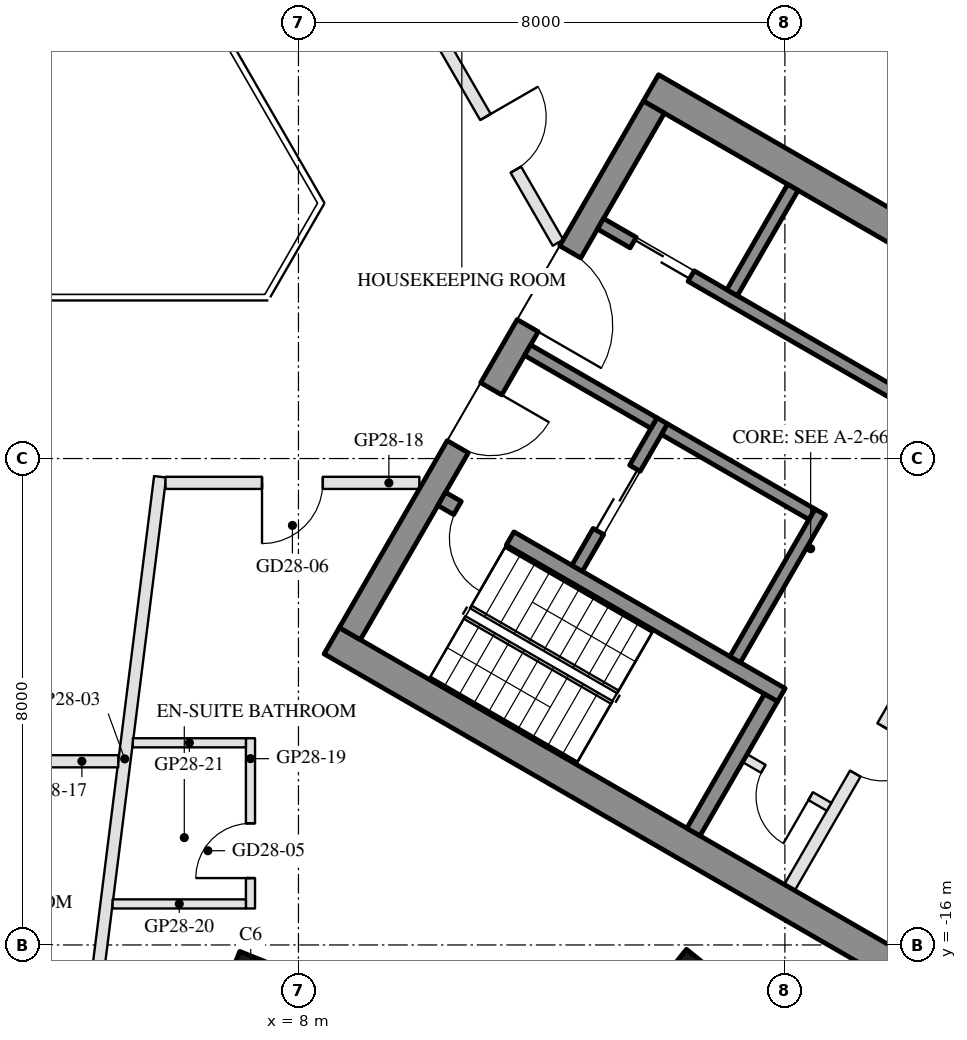
"""IFC4 building model, lengths in metres.
Left out: names, types, materials, properties, quantities, classifications, styles, units other than length and angle.
Written with IfcOpenShell. Run it as: python <this file> out.ifc"""

import sys

from ifc_helpers import new_model, si_unit, direction, frame, frame_2d, origin, origin_2d, place, context, subcontext, project, spatial, rectangle, hollow_rectangle, extrude, boolean, halfspace, element, fill, save


model = new_model("IFC4")
c1 = context("Model", 3, precision=1e-05, world=origin(), true_north=direction((0.0, 1.0)))
c2 = subcontext(c1, "Body", "Model", "MODEL_VIEW")
j1 = project(units=[si_unit("LENGTHUNIT", "METRE"), si_unit("PLANEANGLEUNIT", "RADIAN")], contexts=[c1])
p1 = place(None, origin())
s1 = spatial("IfcSite", under=j1, at=p1, CompositionType="ELEMENT")
p2 = place(p1, origin())
s2 = spatial("IfcBuilding", under=s1, at=p2, CompositionType="ELEMENT")
p3 = place(p2, frame((0.0, 0.0, 287.4)))
s3 = spatial("IfcBuildingStorey", under=s2, at=p3, CompositionType="ELEMENT", Elevation=287.4)
p4 = place(p3, frame((7.215, -16.529, 0.0), z_axis=(-0.060866554019, 0.151222465225, 0.986624056373), x_axis=(0.998135530126, 0.004712991743, 0.06085434421)))
e1 = element("IfcColumn", 1, at=p4, inside=s3, PredefinedType="COLUMN", context=c2, shape_type="SweptSolid", body=[
    boolean("DIFFERENCE", boolean("DIFFERENCE", extrude(hollow_rectangle(XDim=0.65, YDim=0.65, WallThickness=0.03, at=origin_2d()), origin(), (0.0, 0.0, 1.0), 3.75), halfspace(frame((0.0, 0.0, 0.04), z_axis=(0.0, 0.0, 1.0), x_axis=(1.0, 0.0, 0.0)), True)), halfspace(frame((0.0, 0.0, 3.711), z_axis=(0.0, 0.0, 1.0), x_axis=(1.0, 0.0, 0.0)), False)),
])
p5 = place(p3, frame((14.431, -16.529, 0.0), z_axis=(-0.121062211455, 0.150389046636, 0.981186565139), x_axis=(0.992602517882, 0.00920416117, 0.121060005413)))
e2 = element("IfcColumn", 2, at=p5, inside=s3, PredefinedType="COLUMN", context=c2, shape_type="SweptSolid", body=[
    boolean("DIFFERENCE", boolean("DIFFERENCE", extrude(hollow_rectangle(XDim=0.65, YDim=0.65, WallThickness=0.03, at=origin_2d()), origin(), (0.0, 0.0, 1.0), 3.771), halfspace(frame((0.0, 0.0, 0.047), z_axis=(0.0, 0.0, 1.0), x_axis=(1.0, 0.0, 0.0)), True)), halfspace(frame((0.0, 0.0, 3.724), z_axis=(0.0, 0.0, 1.0), x_axis=(1.0, 0.0, 0.0)), False)),
])
for number, where, z_axis, x_axis in (
    (3, (8.547, -10.997, 0.0), (0.0, 0.0, 1.0), (0.866, -0.5, 0.0)),
    (4, (13.797, -1.903, 0.0), (0.0, 0.0, 1.0), (0.866, -0.5, 0.0)),
):
    element("IfcWall", number, at=place(p3, frame(where, z_axis=z_axis, x_axis=x_axis)), inside=s3, PredefinedType="SHEAR", context=c2, shape_type="SweptSolid", body=[
        extrude(rectangle(XDim=12.129, YDim=0.5, at=frame_2d((6.064, 0.0))), origin(), (0.0, 0.0, 1.0), 3.5),
    ])
p6 = place(p3, frame((8.845, -10.88, 0.0), z_axis=(0.0, 0.0, 1.0), x_axis=(0.500004234368, 0.866022959057, 0.0)))
e5 = element("IfcWall", 5, at=p6, inside=s3, PredefinedType="SHEAR", context=c2, shape_type="SweptSolid", body=[
    extrude(rectangle(XDim=10.0, YDim=0.4, at=frame_2d((5.0, 0.0))), origin(), (0.0, 0.0, 1.0), 3.5),
])
p7 = place(p6, frame((3.55, 0.0, 0.0)))
e6 = element("IfcOpeningElement", 6, at=p7, cuts=e5, PredefinedType="OPENING", context=c2, shape_type="SweptSolid", body=[
    extrude(rectangle(XDim=1.1, YDim=2.1, at=frame_2d((0.55, 1.05))), frame((0.0, 0.21, 0.0), z_axis=(0.0, -1.0, 0.0), x_axis=(1.0, 0.0, 0.0)), (0.0, 0.0, 1.0), 0.42),
])
p8 = place(p6, frame((5.85, 0.0, 0.0)))
e7 = element("IfcOpeningElement", 7, at=p8, cuts=e5, PredefinedType="OPENING", context=c2, shape_type="SweptSolid", body=[
    extrude(rectangle(XDim=1.4, YDim=2.1, at=frame_2d((0.7, 1.05))), frame((0.0, 0.21, 0.0), z_axis=(0.0, -1.0, 0.0), x_axis=(1.0, 0.0, 0.0)), (0.0, 0.0, 1.0), 0.42),
])
p9 = place(p3, frame((10.356, -8.664, 0.0), z_axis=(0.0, 0.0, 1.0), x_axis=(0.866028629588, -0.499994412703, 0.0)))
e8 = element("IfcWall", 8, at=p9, inside=s3, PredefinedType="SHEAR", context=c2, shape_type="SweptSolid", body=[
    extrude(rectangle(XDim=6.45, YDim=0.25, at=frame_2d((3.225, 0.0))), origin(), (0.0, 0.0, 1.0), 3.5),
])
p10 = place(p9, frame((0.3, 0.0, 0.0)))
e9 = element("IfcOpeningElement", 9, at=p10, cuts=e8, PredefinedType="OPENING", context=c2, shape_type="SweptSolid", body=[
    extrude(rectangle(XDim=1.0, YDim=2.1, at=frame_2d((0.5, 1.05))), frame((0.0, 0.135, 0.0), z_axis=(0.0, -1.0, 0.0), x_axis=(1.0, 0.0, 0.0)), (0.0, 0.0, 1.0), 0.27),
])
p11 = place(p3, frame((14.496, -14.143, 0.0), z_axis=(0.0, 0.0, 1.0), x_axis=(0.500062241894, 0.865989465428, 0.0)))
e10 = element("IfcWall", 10, at=p11, inside=s3, PredefinedType="SHEAR", context=c2, shape_type="SweptSolid", body=[
    extrude(rectangle(XDim=2.55, YDim=0.25, at=frame_2d((1.275, 0.0))), origin(), (0.0, 0.0, 1.0), 3.5),
])
p12 = place(p3, frame((15.181, -11.305, 0.0), z_axis=(0.0, 0.0, 1.0), x_axis=(0.49994636267, 0.866056369097, 0.0)))
e11 = element("IfcWall", 11, at=p12, inside=s3, PredefinedType="SHEAR", context=c2, shape_type="SweptSolid", body=[
    extrude(rectangle(XDim=2.8, YDim=0.2, at=frame_2d((1.4, 0.0))), origin(), (0.0, 0.0, 1.0), 3.5),
])
p13 = place(p3, frame((12.583, -9.805, 0.0), z_axis=(0.0, 0.0, 1.0), x_axis=(0.49994636267, 0.866056369097, 0.0)))
e12 = element("IfcWall", 12, at=p13, inside=s3, PredefinedType="SHEAR", context=c2, shape_type="SweptSolid", body=[
    extrude(rectangle(XDim=2.8, YDim=0.2, at=frame_2d((1.4, 0.0))), origin(), (0.0, 0.0, 1.0), 3.5),
])
p14 = place(p13, frame((0.7, 0.0, 0.0)))
e13 = element("IfcOpeningElement", 13, at=p14, cuts=e12, PredefinedType="OPENING", context=c2, shape_type="SweptSolid", body=[
    extrude(rectangle(XDim=1.2, YDim=2.1, at=frame_2d((0.6, 1.05))), frame((0.0, 0.11, 0.0), z_axis=(0.0, -1.0, 0.0), x_axis=(1.0, 0.0, 0.0)), (0.0, 0.0, 1.0), 0.22),
])
p15 = place(p3, frame((11.768, -6.217, 0.0), z_axis=(0.0, 0.0, 1.0), x_axis=(0.866050077142, -0.499957262057, 0.0)))
e14 = element("IfcWall", 14, at=p15, inside=s3, PredefinedType="SHEAR", context=c2, shape_type="SweptSolid", body=[
    extrude(rectangle(XDim=2.4, YDim=0.2, at=frame_2d((1.2, 0.0))), origin(), (0.0, 0.0, 1.0), 3.5),
])
p16 = place(p3, frame((14.02, -7.517, 0.0), z_axis=(0.0, 0.0, 1.0), x_axis=(0.866034573852, -0.49998411664, 0.0)))
e15 = element("IfcWall", 15, at=p16, inside=s3, PredefinedType="SHEAR", context=c2, shape_type="SweptSolid", body=[
    extrude(rectangle(XDim=2.8, YDim=0.2, at=frame_2d((1.4, 0.0))), origin(), (0.0, 0.0, 1.0), 3.5),
])
p17 = place(p3, frame((12.968, -4.138, 0.0), z_axis=(0.0, 0.0, 1.0), x_axis=(0.866028328073, -0.49999493495, 0.0)))
e16 = element("IfcWall", 16, at=p17, inside=s3, PredefinedType="SHEAR", context=c2, shape_type="SweptSolid", body=[
    extrude(rectangle(XDim=10.16, YDim=0.2, at=frame_2d((5.08, 0.0))), origin(), (0.0, 0.0, 1.0), 3.5),
])
p18 = place(p17, frame((0.62, 0.0, 0.0)))
e17 = element("IfcOpeningElement", 17, at=p18, cuts=e16, PredefinedType="OPENING", context=c2, shape_type="SweptSolid", body=[
    extrude(rectangle(XDim=1.1, YDim=2.1, at=frame_2d((0.55, 1.05))), frame((0.0, 0.11, 0.0), z_axis=(0.0, -1.0, 0.0), x_axis=(1.0, 0.0, 0.0)), (0.0, 0.0, 1.0), 0.22),
])
p19 = place(p17, frame((5.8, 0.0, 0.0)))
e18 = element("IfcOpeningElement", 18, at=p19, cuts=e16, PredefinedType="OPENING", context=c2, shape_type="SweptSolid", body=[
    extrude(rectangle(XDim=0.9, YDim=2.1, at=frame_2d((0.45, 1.05))), frame((0.0, 0.11, 0.0), z_axis=(0.0, -1.0, 0.0), x_axis=(1.0, 0.0, 0.0)), (0.0, 0.0, 1.0), 0.22),
])
p20 = place(p3, frame((15.131, -5.272, 0.0), z_axis=(0.0, 0.0, 1.0), x_axis=(0.499972520799, 0.866041268327, 0.0)))
e19 = element("IfcWall", 19, at=p20, inside=s3, PredefinedType="SHEAR", context=c2, shape_type="SweptSolid", body=[
    extrude(rectangle(XDim=2.0, YDim=0.2, at=frame_2d((1.0, 0.0))), origin(), (0.0, 0.0, 1.0), 3.5),
])
p21 = place(p3, frame((16.076, -15.055, 0.0), z_axis=(0.0, 0.0, 1.0), x_axis=(0.499995103361, 0.866028230842, 0.0)))
e20 = element("IfcWall", 20, at=p21, inside=s3, PredefinedType="PARTITIONING", context=c2, shape_type="SweptSolid", body=[
    extrude(rectangle(XDim=5.4, YDim=0.2, at=frame_2d((2.7, 0.0))), origin(), (0.0, 0.0, 1.0), 3.5),
])
p22 = place(p21, frame((2.163, 0.0, 0.0)))
e21 = element("IfcOpeningElement", 21, at=p22, cuts=e20, PredefinedType="OPENING", context=c2, shape_type="SweptSolid", body=[
    extrude(rectangle(XDim=0.9, YDim=2.1, at=frame_2d((0.45, 1.05))), frame((0.0, 0.11, 0.0), z_axis=(0.0, -1.0, 0.0), x_axis=(1.0, 0.0, 0.0)), (0.0, 0.0, 1.0), 0.22),
])
p23 = place(p21, frame((4.038, 0.0, 0.0)))
e22 = element("IfcOpeningElement", 22, at=p23, cuts=e20, PredefinedType="OPENING", context=c2, shape_type="SweptSolid", body=[
    extrude(rectangle(XDim=0.9, YDim=2.1, at=frame_2d((0.45, 1.05))), frame((0.0, 0.11, 0.0), z_axis=(0.0, -1.0, 0.0), x_axis=(1.0, 0.0, 0.0)), (0.0, 0.0, 1.0), 0.22),
])
p24 = place(p3, frame((15.342, -12.928, 0.0), z_axis=(0.0, 0.0, 1.0), x_axis=(0.865989903783, -0.500061482766, 0.0)))
e23 = element("IfcWall", 23, at=p24, inside=s3, PredefinedType="PARTITIONING", context=c2, shape_type="SweptSolid", body=[
    extrude(rectangle(XDim=1.6, YDim=0.15, at=frame_2d((0.8, 0.0))), origin(), (0.0, 0.0, 1.0), 3.5),
])
p25 = place(p24, frame((0.35, 0.0, 0.0)))
e24 = element("IfcOpeningElement", 24, at=p25, cuts=e23, PredefinedType="OPENING", context=c2, shape_type="SweptSolid", body=[
    extrude(rectangle(XDim=0.9, YDim=2.1, at=frame_2d((0.45, 1.05))), frame((0.0, 0.085, 0.0), z_axis=(0.0, -1.0, 0.0), x_axis=(1.0, 0.0, 0.0)), (0.0, 0.0, 1.0), 0.17),
])
p26 = place(p3, frame((4.56, -17.579, 0.0), z_axis=(0.0, 0.0, 1.0), x_axis=(0.124584174438, 0.992209042228, 0.0)))
e25 = element("IfcWall", 25, at=p26, inside=s3, PredefinedType="PARTITIONING", context=c2, shape_type="SweptSolid", body=[
    extrude(rectangle(XDim=9.351, YDim=0.2, at=frame_2d((4.676, 0.0))), origin(), (0.0, 0.0, 1.0), 3.1),
])
p27 = place(p3, frame((5.037, -12.979, 0.0), z_axis=(0.0, 0.0, 1.0), x_axis=(-1.0, 0.0, 0.0)))
e26 = element("IfcWall", 26, at=p27, inside=s3, PredefinedType="PARTITIONING", context=c2, shape_type="SweptSolid", body=[
    extrude(rectangle(XDim=4.988, YDim=0.2, at=frame_2d((2.494, 0.0))), origin(), (0.0, 0.0, 1.0), 3.05),
])
p28 = place(p27, frame((1.994, 0.0, 0.0)))
e27 = element("IfcOpeningElement", 27, at=p28, cuts=e26, PredefinedType="OPENING", context=c2, shape_type="SweptSolid", body=[
    extrude(rectangle(XDim=1.0, YDim=2.1, at=frame_2d((0.5, 1.05))), frame((0.0, 0.11, 0.0), z_axis=(0.0, -1.0, 0.0), x_axis=(1.0, 0.0, 0.0)), (0.0, 0.0, 1.0), 0.22),
])
p29 = place(p3, frame((9.988, -8.4, 0.0), z_axis=(0.0, 0.0, 1.0), x_axis=(-1.0, 0.0, 0.0)))
e28 = element("IfcWall", 28, at=p29, inside=s3, PredefinedType="PARTITIONING", context=c2, shape_type="SweptSolid", body=[
    extrude(rectangle(XDim=4.175, YDim=0.2, at=frame_2d((2.087, 0.0))), origin(), (0.0, 0.0, 1.0), 3.05),
])
p30 = place(p29, frame((1.587, 0.0, 0.0)))
e29 = element("IfcOpeningElement", 29, at=p30, cuts=e28, PredefinedType="OPENING", context=c2, shape_type="SweptSolid", body=[
    extrude(rectangle(XDim=1.0, YDim=2.1, at=frame_2d((0.5, 1.05))), frame((0.0, 0.11, 0.0), z_axis=(0.0, -1.0, 0.0), x_axis=(1.0, 0.0, 0.0)), (0.0, 0.0, 1.0), 0.22),
])
p31 = place(p3, frame((7.211, -15.4, 0.0), z_axis=(0.0, 0.0, 1.0), x_axis=(0.0, 1.0, 0.0)))
e30 = element("IfcWall", 30, at=p31, inside=s3, PredefinedType="PARTITIONING", context=c2, shape_type="SweptSolid", body=[
    extrude(rectangle(XDim=2.8, YDim=0.15, at=frame_2d((1.4, 0.0))), origin(), (0.0, 0.0, 1.0), 3.55),
])
p32 = place(p31, frame((0.5, 0.0, 0.0)))
e31 = element("IfcOpeningElement", 31, at=p32, cuts=e30, PredefinedType="OPENING", context=c2, shape_type="SweptSolid", body=[
    extrude(rectangle(XDim=0.9, YDim=2.1, at=frame_2d((0.45, 1.05))), frame((0.0, 0.085, 0.0), z_axis=(0.0, -1.0, 0.0), x_axis=(1.0, 0.0, 0.0)), (0.0, 0.0, 1.0), 0.17),
])
p33 = place(p3, frame((4.944, -15.325, 0.0), z_axis=(0.0, 0.0, 1.0), x_axis=(1.0, 0.0, 0.0)))
e32 = element("IfcWall", 32, at=p33, inside=s3, PredefinedType="PARTITIONING", context=c2, shape_type="SweptSolid", body=[
    extrude(rectangle(XDim=2.192, YDim=0.15, at=frame_2d((1.096, 0.0))), origin(), (0.0, 0.0, 1.0), 3.05),
])
p34 = place(p3, frame((5.277, -12.675, 0.0), z_axis=(0.0, 0.0, 1.0), x_axis=(1.0, 0.0, 0.0)))
e33 = element("IfcWall", 33, at=p34, inside=s3, PredefinedType="PARTITIONING", context=c2, shape_type="SweptSolid", body=[
    extrude(rectangle(XDim=1.859, YDim=0.15, at=frame_2d((0.93, 0.0))), origin(), (0.0, 0.0, 1.0), 3.05),
])
p35 = place(p3, frame((10.382, -1.182, 0.0), z_axis=(0.0, 0.0, 1.0), x_axis=(0.50002859319, -0.866008894869, 0.0)))
e34 = element("IfcWall", 34, at=p35, inside=s3, PredefinedType="PARTITIONING", context=c2, shape_type="SweptSolid", body=[
    extrude(rectangle(XDim=3.774, YDim=0.2, at=frame_2d((1.887, 0.0))), origin(), (0.0, 0.0, 1.0), 3.05),
])
p36 = place(p35, frame((1.387, 0.0, 0.0)))
e35 = element("IfcOpeningElement", 35, at=p36, cuts=e34, PredefinedType="OPENING", context=c2, shape_type="SweptSolid", body=[
    extrude(rectangle(XDim=1.0, YDim=2.1, at=frame_2d((0.5, 1.05))), frame((0.0, 0.11, 0.0), z_axis=(0.0, -1.0, 0.0), x_axis=(1.0, 0.0, 0.0)), (0.0, 0.0, 1.0), 0.22),
])
p37 = place(p14, origin())
e36 = element("IfcDoor", 36, at=p37, inside=s3, OperationType="DOUBLE_DOOR_SLIDING", PredefinedType="DOOR", context=c2, shape_type="SweptSolid", body=[
    extrude(rectangle(XDim=1.2, YDim=2.1, at=frame_2d((0.6, 1.05))), frame((0.0, 0.025, 0.0), z_axis=(0.0, -1.0, 0.0), x_axis=(1.0, 0.0, 0.0)), (0.0, 0.0, 1.0), 0.05),
])
fill(e13, e36)
p38 = place(p25, frame((0.9, 0.0, 0.0), z_axis=(0.0, 0.0, 1.0), x_axis=(-1.0, 0.0, 0.0)))
e37 = element("IfcDoor", 37, at=p38, inside=s3, OperationType="SINGLE_SWING_LEFT", PredefinedType="DOOR", context=c2, shape_type="SweptSolid", body=[
    extrude(rectangle(XDim=0.9, YDim=2.1, at=frame_2d((0.45, 1.05))), frame((0.0, 0.025, 0.0), z_axis=(0.0, -1.0, 0.0), x_axis=(1.0, 0.0, 0.0)), (0.0, 0.0, 1.0), 0.05),
])
fill(e24, e37)
p39 = place(p18, origin())
e38 = element("IfcDoor", 38, at=p39, inside=s3, OperationType="DOUBLE_DOOR_SLIDING", PredefinedType="DOOR", context=c2, shape_type="SweptSolid", body=[
    extrude(rectangle(XDim=1.1, YDim=2.1, at=frame_2d((0.55, 1.05))), frame((0.0, 0.025, 0.0), z_axis=(0.0, -1.0, 0.0), x_axis=(1.0, 0.0, 0.0)), (0.0, 0.0, 1.0), 0.05),
])
fill(e17, e38)
p40 = place(p22, frame((0.9, 0.0, 0.0), z_axis=(0.0, 0.0, 1.0), x_axis=(-1.0, 0.0, 0.0)))
e39 = element("IfcDoor", 39, at=p40, inside=s3, OperationType="SINGLE_SWING_LEFT", PredefinedType="DOOR", context=c2, shape_type="SweptSolid", body=[
    extrude(rectangle(XDim=0.9, YDim=2.1, at=frame_2d((0.45, 1.05))), frame((0.0, 0.025, 0.0), z_axis=(0.0, -1.0, 0.0), x_axis=(1.0, 0.0, 0.0)), (0.0, 0.0, 1.0), 0.05),
])
fill(e21, e39)
p41 = place(p7, frame((1.1, 0.0, 0.0), z_axis=(0.0, 0.0, 1.0), x_axis=(-1.0, 0.0, 0.0)))
e40 = element("IfcDoor", 40, at=p41, inside=s3, OperationType="SINGLE_SWING_LEFT", PredefinedType="DOOR", context=c2, shape_type="SweptSolid", body=[
    extrude(rectangle(XDim=1.1, YDim=2.1, at=frame_2d((0.55, 1.05))), frame((0.0, 0.025, 0.0), z_axis=(0.0, -1.0, 0.0), x_axis=(1.0, 0.0, 0.0)), (0.0, 0.0, 1.0), 0.05),
])
fill(e6, e40)
p42 = place(p8, frame((1.4, 0.0, 0.0), z_axis=(0.0, 0.0, 1.0), x_axis=(-1.0, 0.0, 0.0)))
e41 = element("IfcDoor", 41, at=p42, inside=s3, OperationType="DOUBLE_DOOR_SINGLE_SWING", PredefinedType="DOOR", context=c2, shape_type="SweptSolid", body=[
    extrude(rectangle(XDim=1.4, YDim=2.1, at=frame_2d((0.7, 1.05))), frame((0.0, 0.025, 0.0), z_axis=(0.0, -1.0, 0.0), x_axis=(1.0, 0.0, 0.0)), (0.0, 0.0, 1.0), 0.05),
])
fill(e7, e41)
p43 = place(p10, frame((1.0, 0.0, 0.0), z_axis=(0.0, 0.0, 1.0), x_axis=(-1.0, 0.0, 0.0)))
e42 = element("IfcDoor", 42, at=p43, inside=s3, OperationType="SINGLE_SWING_LEFT", PredefinedType="DOOR", context=c2, shape_type="SweptSolid", body=[
    extrude(rectangle(XDim=1.0, YDim=2.1, at=frame_2d((0.5, 1.05))), frame((0.0, 0.025, 0.0), z_axis=(0.0, -1.0, 0.0), x_axis=(1.0, 0.0, 0.0)), (0.0, 0.0, 1.0), 0.05),
])
fill(e9, e42)
p44 = place(p32, origin())
e43 = element("IfcDoor", 43, at=p44, inside=s3, OperationType="SINGLE_SWING_LEFT", PredefinedType="DOOR", context=c2, shape_type="SweptSolid", body=[
    extrude(rectangle(XDim=0.9, YDim=2.1, at=frame_2d((0.45, 1.05))), frame((0.0, 0.025, 0.0), z_axis=(0.0, -1.0, 0.0), x_axis=(1.0, 0.0, 0.0)), (0.0, 0.0, 1.0), 0.05),
])
fill(e31, e43)
p45 = place(p30, origin())
e44 = element("IfcDoor", 44, at=p45, inside=s3, OperationType="SINGLE_SWING_RIGHT", PredefinedType="DOOR", context=c2, shape_type="SweptSolid", body=[
    extrude(rectangle(XDim=1.0, YDim=2.1, at=frame_2d((0.5, 1.05))), frame((0.0, 0.025, 0.0), z_axis=(0.0, -1.0, 0.0), x_axis=(1.0, 0.0, 0.0)), (0.0, 0.0, 1.0), 0.05),
])
fill(e29, e44)
p46 = place(p36, origin())
e45 = element("IfcDoor", 45, at=p46, inside=s3, OperationType="SINGLE_SWING_LEFT", PredefinedType="DOOR", context=c2, shape_type="SweptSolid", body=[
    extrude(rectangle(XDim=1.0, YDim=2.1, at=frame_2d((0.5, 1.05))), frame((0.0, 0.025, 0.0), z_axis=(0.0, -1.0, 0.0), x_axis=(1.0, 0.0, 0.0)), (0.0, 0.0, 1.0), 0.05),
])
fill(e35, e45)
save(model, sys.argv[1])
